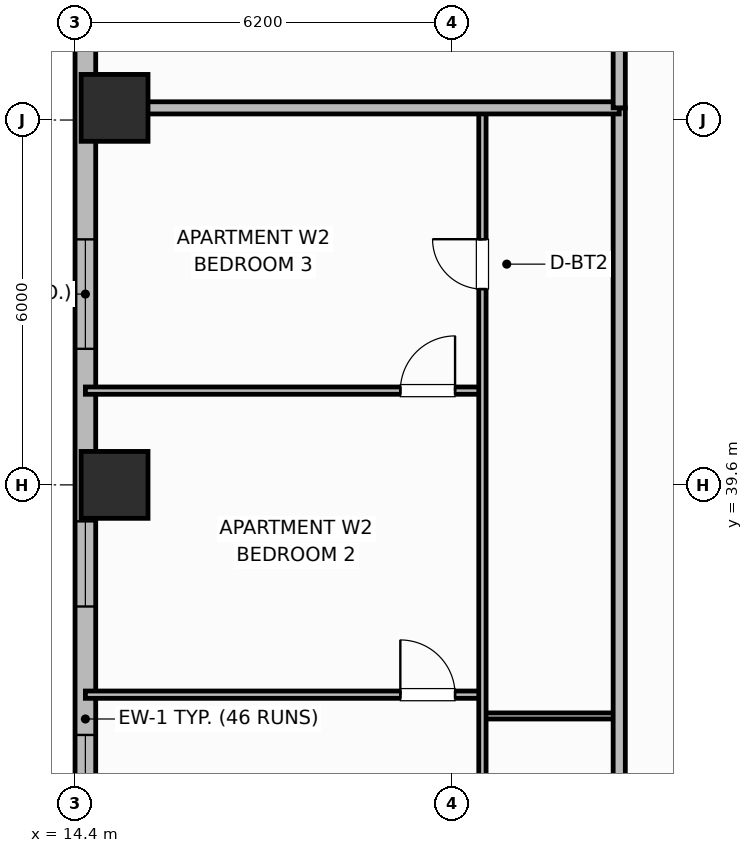
"""IFC4 building model, lengths in metres.
Left out: names, types, materials, properties, quantities, classifications, styles, units other than length and angle.
Written with IfcOpenShell. Run it as: python <this file> out.ifc"""

import sys

from ifc_helpers import new_model, si_unit, direction, frame, frame_2d, origin, origin_2d, place, context, subcontext, project, spatial, rectangle, extrude, element, fill, save


model = new_model("IFC4")
c1 = context("Model", 3, precision=1e-05, world=origin(), true_north=direction((0.0, 1.0)))
c2 = subcontext(c1, "Body", "Model", "MODEL_VIEW")
j1 = project(units=[si_unit("LENGTHUNIT", "METRE"), si_unit("PLANEANGLEUNIT", "RADIAN")], contexts=[c1])
p1 = place(None, origin())
s1 = spatial("IfcSite", under=j1, at=p1, CompositionType="ELEMENT")
p2 = place(p1, origin())
s2 = spatial("IfcBuilding", under=s1, at=p2, CompositionType="ELEMENT")
p3 = place(p2, frame((0.0, 0.0, 125.3)))
s3 = spatial("IfcBuildingStorey", under=s2, at=p3, CompositionType="ELEMENT", Elevation=125.3)
for number, where, z_axis, x_axis in (
    (1, (15.05, 39.6, 0.0), (0.0, 0.0, 1.0), (1.0, 0.0, 0.0)),
    (2, (15.05, 45.8, 0.0), (0.0, 0.0, 1.0), (1.0, 0.0, 0.0)),
):
    element("IfcColumn", number, at=place(p3, frame(where, z_axis=z_axis, x_axis=x_axis)), inside=s3, PredefinedType="COLUMN", context=c2, shape_type="SweptSolid", body=[
        extrude(rectangle(XDim=1.1, YDim=1.1, at=origin_2d()), origin(), (0.0, 0.0, 1.0), 3.7),
    ])
p4 = place(p3, frame((14.57, 47.4, 0.0), z_axis=(0.0, 0.0, 1.0), x_axis=(0.0, -1.0, 0.0)))
e3 = element("IfcWall", 3, at=p4, inside=s3, PredefinedType="SOLIDWALL", context=c2, shape_type="SweptSolid", body=[
    extrude(rectangle(XDim=14.8, YDim=0.34, at=frame_2d((7.4, 0.0))), origin(), (0.0, 0.0, 1.0), 2.7),
])
p5 = place(p4, frame((3.762, 0.0, 0.73)))
e4 = element("IfcOpeningElement", 4, at=p5, cuts=e3, PredefinedType="OPENING", context=c2, shape_type="SweptSolid", body=[
    extrude(rectangle(XDim=1.8, YDim=1.85, at=frame_2d((0.9, 0.925))), frame((0.0, 0.18, 0.0), z_axis=(0.0, -1.0, 0.0), x_axis=(1.0, 0.0, 0.0)), (0.0, 0.0, 1.0), 0.36),
])
p6 = place(p4, frame((8.4, 0.0, 0.69)))
e5 = element("IfcOpeningElement", 5, at=p6, cuts=e3, PredefinedType="OPENING", context=c2, shape_type="SweptSolid", body=[
    extrude(rectangle(XDim=1.4, YDim=1.85, at=frame_2d((0.7, 0.925))), frame((0.0, 0.18, 0.0), z_axis=(0.0, -1.0, 0.0), x_axis=(1.0, 0.0, 0.0)), (0.0, 0.0, 1.0), 0.36),
])
p7 = place(p4, frame((11.913, 0.0, 0.73)))
e6 = element("IfcOpeningElement", 6, at=p7, cuts=e3, PredefinedType="OPENING", context=c2, shape_type="SweptSolid", body=[
    extrude(rectangle(XDim=1.8, YDim=1.85, at=frame_2d((0.9, 0.925))), frame((0.0, 0.18, 0.0), z_axis=(0.0, -1.0, 0.0), x_axis=(1.0, 0.0, 0.0)), (0.0, 0.0, 1.0), 0.36),
])
p8 = place(p3, frame((21.1, 35.8, 0.0), z_axis=(0.0, 0.0, 1.0), x_axis=(1.0, 0.0, 0.0)))
e7 = element("IfcWall", 7, at=p8, inside=s3, PredefinedType="PARTITIONING", context=c2, shape_type="SweptSolid", body=[
    extrude(rectangle(XDim=2.25, YDim=0.1, at=frame_2d((1.125, 0.0))), origin(), (0.0, 0.0, 1.0), 2.53),
])
p9 = place(p3, frame((14.57, 36.15, 0.0), z_axis=(0.0, 0.0, 1.0), x_axis=(1.0, 0.0, 0.0)))
e8 = element("IfcWall", 8, at=p9, inside=s3, PredefinedType="PARTITIONING", context=c2, shape_type="SweptSolid", body=[
    extrude(rectangle(XDim=6.53, YDim=0.12, at=frame_2d((3.265, 0.0))), origin(), (0.0, 0.0, 1.0), 2.53),
])
p10 = place(p9, frame((5.18, 0.0, 0.0)))
e9 = element("IfcOpeningElement", 9, at=p10, cuts=e8, PredefinedType="OPENING", context=c2, shape_type="SweptSolid", body=[
    extrude(rectangle(XDim=0.9, YDim=2.1, at=frame_2d((0.45, 1.05))), frame((0.0, 0.07, 0.0), z_axis=(0.0, -1.0, 0.0), x_axis=(1.0, 0.0, 0.0)), (0.0, 0.0, 1.0), 0.14),
])
p11 = place(p3, frame((14.57, 41.15, 0.0), z_axis=(0.0, 0.0, 1.0), x_axis=(1.0, 0.0, 0.0)))
e10 = element("IfcWall", 10, at=p11, inside=s3, PredefinedType="PARTITIONING", context=c2, shape_type="SweptSolid", body=[
    extrude(rectangle(XDim=6.53, YDim=0.12, at=frame_2d((3.265, 0.0))), origin(), (0.0, 0.0, 1.0), 2.53),
])
p12 = place(p11, frame((5.18, 0.0, 0.0)))
e11 = element("IfcOpeningElement", 11, at=p12, cuts=e10, PredefinedType="OPENING", context=c2, shape_type="SweptSolid", body=[
    extrude(rectangle(XDim=0.9, YDim=2.1, at=frame_2d((0.45, 1.05))), frame((0.0, 0.07, 0.0), z_axis=(0.0, -1.0, 0.0), x_axis=(1.0, 0.0, 0.0)), (0.0, 0.0, 1.0), 0.14),
])
p13 = place(p3, frame((21.1, 26.64, 0.0), z_axis=(0.0, 0.0, 1.0), x_axis=(0.0, 1.0, 0.0)))
e12 = element("IfcWall", 12, at=p13, inside=s3, PredefinedType="PARTITIONING", context=c2, shape_type="SweptSolid", body=[
    extrude(rectangle(XDim=19.12, YDim=0.12, at=frame_2d((9.56, 0.0))), origin(), (0.0, 0.0, 1.0), 2.53),
])
p14 = place(p13, frame((2.81, 0.0, 0.0)))
e13 = element("IfcOpeningElement", 13, at=p14, cuts=e12, PredefinedType="OPENING", context=c2, shape_type="SweptSolid", body=[
    extrude(rectangle(XDim=0.9, YDim=2.1, at=frame_2d((0.45, 1.05))), frame((0.0, 0.07, 0.0), z_axis=(0.0, -1.0, 0.0), x_axis=(1.0, 0.0, 0.0)), (0.0, 0.0, 1.0), 0.14),
])
p15 = place(p13, frame((16.18, 0.0, 0.0)))
e14 = element("IfcOpeningElement", 14, at=p15, cuts=e12, PredefinedType="OPENING", context=c2, shape_type="SweptSolid", body=[
    extrude(rectangle(XDim=0.82, YDim=2.08, at=frame_2d((0.41, 1.04))), frame((0.0, 0.07, 0.0), z_axis=(0.0, -1.0, 0.0), x_axis=(1.0, 0.0, 0.0)), (0.0, 0.0, 1.0), 0.14),
])
p16 = place(p3, frame((23.35, 10.6, 0.0), z_axis=(0.0, 0.0, 1.0), x_axis=(0.0, 1.0, 0.0)))
e15 = element("IfcWall", 15, at=p16, inside=s3, PredefinedType="PARTITIONING", context=c2, shape_type="SweptSolid", body=[
    extrude(rectangle(XDim=35.2, YDim=0.2, at=frame_2d((17.6, 0.0))), origin(), (0.0, 0.0, 1.0), 2.53),
])
p17 = place(p16, frame((2.65, 0.0, 0.0)))
e16 = element("IfcOpeningElement", 16, at=p17, cuts=e15, PredefinedType="OPENING", context=c2, shape_type="SweptSolid", body=[
    extrude(rectangle(XDim=1.0, YDim=2.15, at=frame_2d((0.5, 1.075))), frame((0.0, 0.11, 0.0), z_axis=(0.0, -1.0, 0.0), x_axis=(1.0, 0.0, 0.0)), (0.0, 0.0, 1.0), 0.22),
])
p18 = place(p16, frame((19.95, 0.0, 0.0)))
e17 = element("IfcOpeningElement", 17, at=p18, cuts=e15, PredefinedType="OPENING", context=c2, shape_type="SweptSolid", body=[
    extrude(rectangle(XDim=1.0, YDim=2.15, at=frame_2d((0.5, 1.075))), frame((0.0, 0.11, 0.0), z_axis=(0.0, -1.0, 0.0), x_axis=(1.0, 0.0, 0.0)), (0.0, 0.0, 1.0), 0.22),
])
p19 = place(p3, frame((14.99, 45.8, 0.0), z_axis=(0.0, 0.0, 1.0), x_axis=(1.0, 0.0, 0.0)))
e18 = element("IfcWall", 18, at=p19, inside=s3, PredefinedType="PARTITIONING", context=c2, shape_type="SweptSolid", body=[
    extrude(rectangle(XDim=8.36, YDim=0.2, at=frame_2d((4.18, 0.0))), origin(), (0.0, 0.0, 1.0), 2.53),
])
p20 = place(p3, frame((23.35, 45.8, 0.0), z_axis=(0.0, 0.0, 1.0), x_axis=(0.0, 1.0, 0.0)))
e19 = element("IfcWall", 19, at=p20, inside=s3, PredefinedType="PARTITIONING", context=c2, shape_type="SweptSolid", body=[
    extrude(rectangle(XDim=5.63, YDim=0.2, at=frame_2d((2.815, 0.0))), origin(), (0.0, 0.0, 1.0), 2.53),
])
p21 = place(p5, origin())
e20 = element("IfcWindow", 20, at=p21, inside=s3, PartitioningType="SINGLE_PANEL", PredefinedType="WINDOW", context=c2, shape_type="SweptSolid", body=[
    extrude(rectangle(XDim=1.8, YDim=1.85, at=frame_2d((0.9, 0.925))), frame((0.0, 0.03, 0.0), z_axis=(0.0, -1.0, 0.0), x_axis=(1.0, 0.0, 0.0)), (0.0, 0.0, 1.0), 0.06),
])
fill(e4, e20)
p22 = place(p6, origin())
e21 = element("IfcWindow", 21, at=p22, inside=s3, PartitioningType="SINGLE_PANEL", PredefinedType="WINDOW", context=c2, shape_type="SweptSolid", body=[
    extrude(rectangle(XDim=1.4, YDim=1.85, at=frame_2d((0.7, 0.925))), frame((0.0, 0.03, 0.0), z_axis=(0.0, -1.0, 0.0), x_axis=(1.0, 0.0, 0.0)), (0.0, 0.0, 1.0), 0.06),
])
fill(e5, e21)
p23 = place(p7, origin())
e22 = element("IfcWindow", 22, at=p23, inside=s3, PartitioningType="SINGLE_PANEL", PredefinedType="WINDOW", context=c2, shape_type="SweptSolid", body=[
    extrude(rectangle(XDim=1.8, YDim=1.85, at=frame_2d((0.9, 0.925))), frame((0.0, 0.03, 0.0), z_axis=(0.0, -1.0, 0.0), x_axis=(1.0, 0.0, 0.0)), (0.0, 0.0, 1.0), 0.06),
])
fill(e6, e22)
p24 = place(p10, origin())
e23 = element("IfcDoor", 23, at=p24, inside=s3, OperationType="SINGLE_SWING_LEFT", PredefinedType="DOOR", context=c2, shape_type="SweptSolid", body=[
    extrude(rectangle(XDim=0.9, YDim=2.1, at=frame_2d((0.45, 1.05))), frame((0.0, 0.025, 0.0), z_axis=(0.0, -1.0, 0.0), x_axis=(1.0, 0.0, 0.0)), (0.0, 0.0, 1.0), 0.05),
])
fill(e9, e23)
p25 = place(p12, origin())
e24 = element("IfcDoor", 24, at=p25, inside=s3, OperationType="SINGLE_SWING_RIGHT", PredefinedType="DOOR", context=c2, shape_type="SweptSolid", body=[
    extrude(rectangle(XDim=0.9, YDim=2.1, at=frame_2d((0.45, 1.05))), frame((0.0, 0.025, 0.0), z_axis=(0.0, -1.0, 0.0), x_axis=(1.0, 0.0, 0.0)), (0.0, 0.0, 1.0), 0.05),
])
fill(e11, e24)
p26 = place(p15, origin())
e25 = element("IfcDoor", 25, at=p26, inside=s3, OperationType="SINGLE_SWING_RIGHT", PredefinedType="DOOR", context=c2, shape_type="SweptSolid", body=[
    extrude(rectangle(XDim=0.82, YDim=2.08, at=frame_2d((0.41, 1.04))), frame((0.0, 0.025, 0.0), z_axis=(0.0, -1.0, 0.0), x_axis=(1.0, 0.0, 0.0)), (0.0, 0.0, 1.0), 0.05),
])
fill(e14, e25)
save(model, sys.argv[1])
